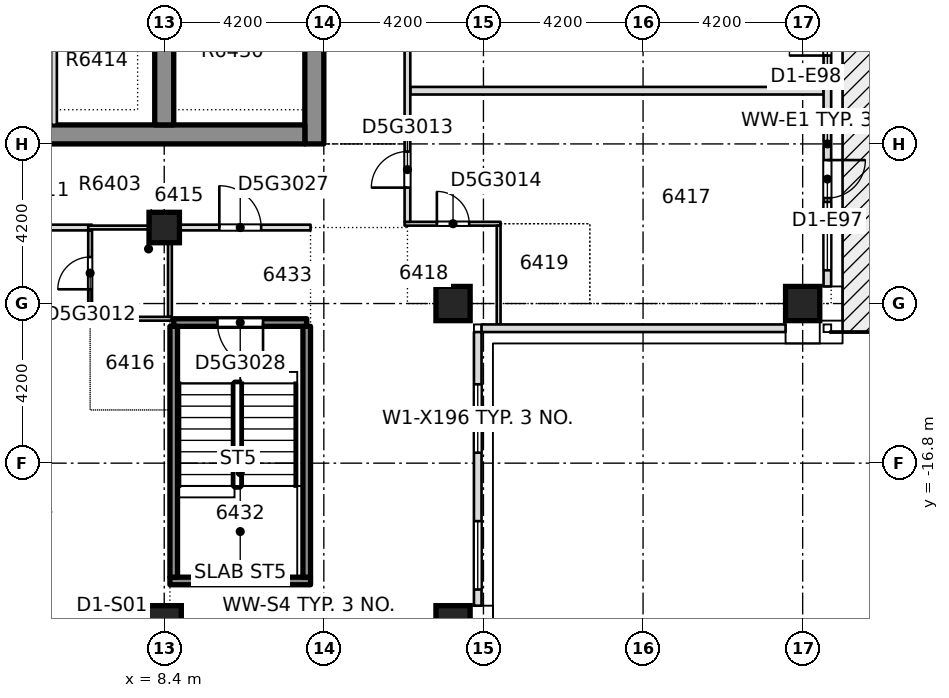
"""IFC4 building model, lengths in metres.
Left out: names, types, materials, properties, quantities, classifications, styles, units other than length and angle.
Written with IfcOpenShell. Run it as: python <this file> out.ifc"""

import sys

from ifc_helpers import new_model, si_unit, direction, frame, frame_2d, origin, origin_2d, place, context, subcontext, project, spatial, rectangle, extrude, element, fill, save


model = new_model("IFC4")
c1 = context("Model", 3, precision=1e-05, world=origin(), true_north=direction((0.0, 1.0)))
c2 = subcontext(c1, "Body", "Model", "MODEL_VIEW")
j1 = project(units=[si_unit("LENGTHUNIT", "METRE"), si_unit("PLANEANGLEUNIT", "RADIAN")], contexts=[c1])
p1 = place(None, origin())
s1 = spatial("IfcSite", under=j1, at=p1, CompositionType="ELEMENT")
p2 = place(p1, origin())
s2 = spatial("IfcBuilding", under=s1, at=p2, CompositionType="ELEMENT")
p3 = place(p2, frame((0.0, 0.0, 244.15)))
s3 = spatial("IfcBuildingStorey", under=s2, at=p3, CompositionType="ELEMENT", Elevation=244.15)
p4 = place(p3, frame((12.35, -8.4, -0.4), z_axis=(0.0, 0.0, 1.0), x_axis=(0.0, 1.0, 0.0)))
e1 = element("IfcWall", 1, at=p4, inside=s3, PredefinedType="SHEAR", context=c2, shape_type="SweptSolid", body=[
    extrude(rectangle(XDim=30.15, YDim=0.5, at=frame_2d((15.075, 0.0))), origin(), (0.0, 0.0, 1.0), 3.45),
])
p5 = place(p4, frame((3.416, 0.0, 0.4)))
e2 = element("IfcOpeningElement", 2, at=p5, cuts=e1, PredefinedType="OPENING", context=c2, shape_type="SweptSolid", body=[
    extrude(rectangle(XDim=0.95, YDim=2.1, at=frame_2d((0.475, 1.05))), frame((0.0, 0.26, 0.0), z_axis=(0.0, -1.0, 0.0), x_axis=(1.0, 0.0, 0.0)), (0.0, 0.0, 1.0), 0.52),
])
p6 = place(p4, frame((7.932, 0.0, 0.4)))
e3 = element("IfcOpeningElement", 3, at=p6, cuts=e1, PredefinedType="OPENING", context=c2, shape_type="SweptSolid", body=[
    extrude(rectangle(XDim=0.95, YDim=2.1, at=frame_2d((0.475, 1.05))), frame((0.0, 0.26, 0.0), z_axis=(0.0, -1.0, 0.0), x_axis=(1.0, 0.0, 0.0)), (0.0, 0.0, 1.0), 0.52),
])
p7 = place(p4, frame((12.144, 0.0, 0.4)))
e4 = element("IfcOpeningElement", 4, at=p7, cuts=e1, PredefinedType="OPENING", context=c2, shape_type="SweptSolid", body=[
    extrude(rectangle(XDim=0.95, YDim=2.1, at=frame_2d((0.475, 1.05))), frame((0.0, 0.26, 0.0), z_axis=(0.0, -1.0, 0.0), x_axis=(1.0, 0.0, 0.0)), (0.0, 0.0, 1.0), 0.52),
])
p8 = place(p4, frame((16.477, 0.0, 0.4)))
e5 = element("IfcOpeningElement", 5, at=p8, cuts=e1, PredefinedType="OPENING", context=c2, shape_type="SweptSolid", body=[
    extrude(rectangle(XDim=0.95, YDim=2.1, at=frame_2d((0.475, 1.05))), frame((0.0, 0.26, 0.0), z_axis=(0.0, -1.0, 0.0), x_axis=(1.0, 0.0, 0.0)), (0.0, 0.0, 1.0), 0.52),
])
p9 = place(p4, frame((23.605, 0.0, 0.4)))
e6 = element("IfcOpeningElement", 6, at=p9, cuts=e1, PredefinedType="OPENING", context=c2, shape_type="SweptSolid", body=[
    extrude(rectangle(XDim=0.95, YDim=2.1, at=frame_2d((0.475, 1.05))), frame((0.0, 0.26, 0.0), z_axis=(0.0, -1.0, 0.0), x_axis=(1.0, 0.0, 0.0)), (0.0, 0.0, 1.0), 0.52),
])
p10 = place(p4, frame((27.63, 0.0, 0.4)))
e7 = element("IfcOpeningElement", 7, at=p10, cuts=e1, PredefinedType="OPENING", context=c2, shape_type="SweptSolid", body=[
    extrude(rectangle(XDim=0.95, YDim=2.1, at=frame_2d((0.475, 1.05))), frame((0.0, 0.26, 0.0), z_axis=(0.0, -1.0, 0.0), x_axis=(1.0, 0.0, 0.0)), (0.0, 0.0, 1.0), 0.52),
])
p11 = place(p4, frame((19.3, 0.0, 0.4)))
e8 = element("IfcOpeningElement", 8, at=p11, cuts=e1, PredefinedType="OPENING", context=c2, shape_type="SweptSolid", body=[
    extrude(rectangle(XDim=1.2, YDim=2.1, at=frame_2d((0.6, 1.05))), frame((0.0, 0.26, 0.0), z_axis=(0.0, -1.0, 0.0), x_axis=(1.0, 0.0, 0.0)), (0.0, 0.0, 1.0), 0.52),
])
p12 = place(p3, frame((-12.1, -8.15, -0.4), z_axis=(0.0, 0.0, 1.0), x_axis=(1.0, 0.0, 0.0)))
e9 = element("IfcWall", 9, at=p12, inside=s3, PredefinedType="SHEAR", context=c2, shape_type="SweptSolid", body=[
    extrude(rectangle(XDim=24.2, YDim=0.5, at=frame_2d((12.1, 0.0))), origin(), (0.0, 0.0, 1.0), 3.45),
])
p13 = place(p12, frame((7.35, 0.0, 0.4)))
e10 = element("IfcOpeningElement", 10, at=p13, cuts=e9, PredefinedType="OPENING", context=c2, shape_type="SweptSolid", body=[
    extrude(rectangle(XDim=1.8, YDim=2.1, at=frame_2d((0.9, 1.05))), frame((0.0, 0.26, 0.0), z_axis=(0.0, -1.0, 0.0), x_axis=(1.0, 0.0, 0.0)), (0.0, 0.0, 1.0), 0.52),
])
p14 = place(p12, frame((15.05, 0.0, 0.4)))
e11 = element("IfcOpeningElement", 11, at=p14, cuts=e9, PredefinedType="OPENING", context=c2, shape_type="SweptSolid", body=[
    extrude(rectangle(XDim=1.8, YDim=2.1, at=frame_2d((0.9, 1.05))), frame((0.0, 0.26, 0.0), z_axis=(0.0, -1.0, 0.0), x_axis=(1.0, 0.0, 0.0)), (0.0, 0.0, 1.0), 0.52),
])
p15 = place(p3, frame((8.4, -7.9, -0.4), z_axis=(0.0, 0.0, 1.0), x_axis=(0.0, 1.0, 0.0)))
e12 = element("IfcWall", 12, at=p15, inside=s3, PredefinedType="SHEAR", context=c2, shape_type="SweptSolid", body=[
    extrude(rectangle(XDim=29.15, YDim=0.5, at=frame_2d((14.575, 0.0))), origin(), (0.0, 0.0, 1.0), 3.45),
])
p16 = place(p15, frame((18.8, 0.0, 0.4)))
e13 = element("IfcOpeningElement", 13, at=p16, cuts=e12, PredefinedType="OPENING", context=c2, shape_type="SweptSolid", body=[
    extrude(rectangle(XDim=1.2, YDim=2.1, at=frame_2d((0.6, 1.05))), frame((0.0, 0.26, 0.0), z_axis=(0.0, -1.0, 0.0), x_axis=(1.0, 0.0, 0.0)), (0.0, 0.0, 1.0), 0.52),
])
for number, where, z_axis, x_axis in (
    (14, (8.4, -21.0, -0.4), (0.0, 0.0, 1.0), (1.0, 0.0, 0.0)),
    (15, (16.0, -21.0, -0.4), (0.0, 0.0, 1.0), (1.0, 0.0, 0.0)),
    (16, (16.0, -12.6, -0.4), (0.0, 0.0, 1.0), (1.0, 0.0, 0.0)),
    (17, (25.2, -12.6, -0.4), (0.0, 0.0, 1.0), (1.0, 0.0, 0.0)),
):
    element("IfcColumn", number, at=place(p3, frame(where, z_axis=z_axis, x_axis=x_axis)), inside=s3, PredefinedType="COLUMN", context=c2, shape_type="SweptSolid", body=[
        extrude(rectangle(XDim=0.9, YDim=0.9, at=origin_2d()), origin(), (0.0, 0.0, 1.0), 3.45),
    ])
p17 = place(p3, frame((8.4, -10.6, -0.4), z_axis=(0.0, 0.0, 1.0), x_axis=(1.0, 0.0, 0.0)))
e18 = element("IfcColumn", 18, at=p17, inside=s3, PredefinedType="COLUMN", context=c2, shape_type="SweptSolid", body=[
    extrude(rectangle(XDim=0.8, YDim=0.8, at=origin_2d()), origin(), (0.0, 0.0, 1.0), 3.45),
])
p18 = place(p3, frame((8.65, -13.1, 0.0), z_axis=(0.0, 0.0, 1.0), x_axis=(1.0, 0.0, 0.0)))
e19 = element("IfcWall", 19, at=p18, inside=s3, PredefinedType="SOLIDWALL", context=c2, shape_type="SweptSolid", body=[
    extrude(rectangle(XDim=3.5, YDim=0.2, at=frame_2d((1.75, 0.0))), origin(), (0.0, 0.0, 1.0), 3.05),
])
p19 = place(p18, frame((1.15, 0.0, 0.0)))
e20 = element("IfcOpeningElement", 20, at=p19, cuts=e19, PredefinedType="OPENING", context=c2, shape_type="SweptSolid", body=[
    extrude(rectangle(XDim=1.2, YDim=2.1, at=frame_2d((0.6, 1.05))), frame((0.0, 0.11, 0.0), z_axis=(0.0, -1.0, 0.0), x_axis=(1.0, 0.0, 0.0)), (0.0, 0.0, 1.0), 0.22),
])
p20 = place(p3, frame((6.4, -13.0, 0.0), z_axis=(0.0, 0.0, 1.0), x_axis=(1.0, 0.0, 0.0)))
e21 = element("IfcWall", 21, at=p20, inside=s3, PredefinedType="PARTITIONING", context=c2, shape_type="SweptSolid", body=[
    extrude(rectangle(XDim=2.2, YDim=0.1, at=frame_2d((1.1, 0.0))), origin(), (0.0, 0.0, 1.0), 3.05),
])
p21 = place(p3, frame((-1.9, -10.6, 0.0), z_axis=(0.0, 0.0, 1.0), x_axis=(1.0, 0.0, 0.0)))
e22 = element("IfcWall", 22, at=p21, inside=s3, PredefinedType="PARTITIONING", context=c2, shape_type="SweptSolid", body=[
    extrude(rectangle(XDim=8.4, YDim=0.15, at=frame_2d((4.2, 0.0))), origin(), (0.0, 0.0, 1.0), 3.05),
])
p22 = place(p21, frame((5.575, 0.0, 0.0)))
e23 = element("IfcOpeningElement", 23, at=p22, cuts=e22, PredefinedType="OPENING", context=c2, shape_type="SweptSolid", body=[
    extrude(rectangle(XDim=0.95, YDim=2.1, at=frame_2d((0.475, 1.05))), frame((0.0, 0.085, 0.0), z_axis=(0.0, -1.0, 0.0), x_axis=(1.0, 0.0, 0.0)), (0.0, 0.0, 1.0), 0.17),
])
p23 = place(p21, frame((2.4, 0.0, 0.0)))
e24 = element("IfcOpeningElement", 24, at=p23, cuts=e22, PredefinedType="OPENING", context=c2, shape_type="SweptSolid", body=[
    extrude(rectangle(XDim=1.1, YDim=2.1, at=frame_2d((0.55, 1.05))), frame((0.0, 0.085, 0.0), z_axis=(0.0, -1.0, 0.0), x_axis=(1.0, 0.0, 0.0)), (0.0, 0.0, 1.0), 0.17),
])
p24 = place(p3, frame((6.4, -10.6, 0.0), z_axis=(0.0, 0.0, 1.0), x_axis=(1.0, 0.0, 0.0)))
e25 = element("IfcWall", 25, at=p24, inside=s3, PredefinedType="PARTITIONING", context=c2, shape_type="SweptSolid", body=[
    extrude(rectangle(XDim=2.2, YDim=0.1, at=frame_2d((1.1, 0.0))), origin(), (0.0, 0.0, 1.0), 3.05),
])
p25 = place(p3, frame((8.5, -10.6, 0.0), z_axis=(0.0, 0.0, 1.0), x_axis=(1.0, 0.0, 0.0)))
e26 = element("IfcWall", 26, at=p25, inside=s3, PredefinedType="PARTITIONING", context=c2, shape_type="SweptSolid", body=[
    extrude(rectangle(XDim=3.75, YDim=0.15, at=frame_2d((1.875, 0.0))), origin(), (0.0, 0.0, 1.0), 3.05),
])
p26 = place(p25, frame((1.35, 0.0, 0.0)))
e27 = element("IfcOpeningElement", 27, at=p26, cuts=e26, PredefinedType="OPENING", context=c2, shape_type="SweptSolid", body=[
    extrude(rectangle(XDim=1.1, YDim=2.1, at=frame_2d((0.55, 1.05))), frame((0.0, 0.085, 0.0), z_axis=(0.0, -1.0, 0.0), x_axis=(1.0, 0.0, 0.0)), (0.0, 0.0, 1.0), 0.17),
])
p27 = place(p3, frame((14.725, -10.5, 0.0), z_axis=(0.0, 0.0, 1.0), x_axis=(1.0, 0.0, 0.0)))
e28 = element("IfcWall", 28, at=p27, inside=s3, PredefinedType="PARTITIONING", context=c2, shape_type="SweptSolid", body=[
    extrude(rectangle(XDim=2.525, YDim=0.1, at=frame_2d((1.262, 0.0))), origin(), (0.0, 0.0, 1.0), 3.05),
])
p28 = place(p27, frame((0.85, 0.0, 0.0)))
e29 = element("IfcOpeningElement", 29, at=p28, cuts=e28, PredefinedType="OPENING", context=c2, shape_type="SweptSolid", body=[
    extrude(rectangle(XDim=0.85, YDim=2.1, at=frame_2d((0.425, 1.05))), frame((0.0, 0.06, 0.0), z_axis=(0.0, -1.0, 0.0), x_axis=(1.0, 0.0, 0.0)), (0.0, 0.0, 1.0), 0.12),
])
p29 = place(p3, frame((14.875, -7.0, 0.0), z_axis=(0.0, 0.0, 1.0), x_axis=(1.0, 0.0, 0.0)))
e30 = element("IfcWall", 30, at=p29, inside=s3, PredefinedType="PARTITIONING", context=c2, shape_type="SweptSolid", body=[
    extrude(rectangle(XDim=10.875, YDim=0.2, at=frame_2d((5.438, 0.0))), origin(), (0.0, 0.0, 1.0), 3.05),
])
p30 = place(p3, frame((6.45, -12.95, 0.0), z_axis=(0.0, 0.0, 1.0), x_axis=(0.0, 1.0, 0.0)))
e31 = element("IfcWall", 31, at=p30, inside=s3, PredefinedType="PARTITIONING", context=c2, shape_type="SweptSolid", body=[
    extrude(rectangle(XDim=2.275, YDim=0.1, at=frame_2d((1.137, 0.0))), origin(), (0.0, 0.0, 1.0), 3.05),
])
p31 = place(p30, frame((0.725, 0.0, 0.0)))
e32 = element("IfcOpeningElement", 32, at=p31, cuts=e31, PredefinedType="OPENING", context=c2, shape_type="SweptSolid", body=[
    extrude(rectangle(XDim=0.85, YDim=2.1, at=frame_2d((0.425, 1.05))), frame((0.0, 0.06, 0.0), z_axis=(0.0, -1.0, 0.0), x_axis=(1.0, 0.0, 0.0)), (0.0, 0.0, 1.0), 0.12),
])
p32 = place(p3, frame((8.55, -12.95, 0.0), z_axis=(0.0, 0.0, 1.0), x_axis=(0.0, 1.0, 0.0)))
e33 = element("IfcWall", 33, at=p32, inside=s3, PredefinedType="PARTITIONING", context=c2, shape_type="SweptSolid", body=[
    extrude(rectangle(XDim=2.275, YDim=0.1, at=frame_2d((1.137, 0.0))), origin(), (0.0, 0.0, 1.0), 3.05),
])
p33 = place(p3, frame((14.8, -10.45, 0.0), z_axis=(0.0, 0.0, 1.0), x_axis=(0.0, 1.0, 0.0)))
e34 = element("IfcWall", 34, at=p33, inside=s3, PredefinedType="PARTITIONING", context=c2, shape_type="SweptSolid", body=[
    extrude(rectangle(XDim=19.03, YDim=0.15, at=frame_2d((9.515, 0.0))), origin(), (0.0, 0.0, 1.0), 3.05),
])
p34 = place(p33, frame((0.9, 0.0, 0.0)))
e35 = element("IfcOpeningElement", 35, at=p34, cuts=e34, PredefinedType="OPENING", context=c2, shape_type="SweptSolid", body=[
    extrude(rectangle(XDim=0.95, YDim=2.1, at=frame_2d((0.475, 1.05))), frame((0.0, 0.085, 0.0), z_axis=(0.0, -1.0, 0.0), x_axis=(1.0, 0.0, 0.0)), (0.0, 0.0, 1.0), 0.17),
])
p35 = place(p33, frame((15.965, 0.0, 0.0)))
e36 = element("IfcOpeningElement", 36, at=p35, cuts=e34, PredefinedType="OPENING", context=c2, shape_type="SweptSolid", body=[
    extrude(rectangle(XDim=1.0, YDim=2.1, at=frame_2d((0.5, 1.05))), frame((0.0, 0.085, 0.0), z_axis=(0.0, -1.0, 0.0), x_axis=(1.0, 0.0, 0.0)), (0.0, 0.0, 1.0), 0.17),
])
p36 = place(p33, frame((9.9, 0.0, 0.0)))
e37 = element("IfcOpeningElement", 37, at=p36, cuts=e34, PredefinedType="OPENING", context=c2, shape_type="SweptSolid", body=[
    extrude(rectangle(XDim=1.1, YDim=2.1, at=frame_2d((0.55, 1.05))), frame((0.0, 0.085, 0.0), z_axis=(0.0, -1.0, 0.0), x_axis=(1.0, 0.0, 0.0)), (0.0, 0.0, 1.0), 0.17),
])
p37 = place(p33, frame((4.75, 0.0, 0.0)))
e38 = element("IfcOpeningElement", 38, at=p37, cuts=e34, PredefinedType="OPENING", context=c2, shape_type="SweptSolid", body=[
    extrude(rectangle(XDim=1.0, YDim=2.1, at=frame_2d((0.5, 1.05))), frame((0.0, 0.085, 0.0), z_axis=(0.0, -1.0, 0.0), x_axis=(1.0, 0.0, 0.0)), (0.0, 0.0, 1.0), 0.17),
])
p38 = place(p3, frame((17.2, -13.15, 0.0), z_axis=(0.0, 0.0, 1.0), x_axis=(0.0, 1.0, 0.0)))
e39 = element("IfcWall", 39, at=p38, inside=s3, PredefinedType="PARTITIONING", context=c2, shape_type="SweptSolid", body=[
    extrude(rectangle(XDim=2.6, YDim=0.1, at=frame_2d((1.3, 0.0))), origin(), (0.0, 0.0, 1.0), 3.05),
])
p39 = place(p3, frame((16.65, -20.55, 0.0), z_axis=(0.0, 0.0, 1.0), x_axis=(0.0, 1.0, 0.0)))
e40 = element("IfcWall", 40, at=p39, inside=s3, PredefinedType="STANDARD", context=c2, shape_type="SweptSolid", body=[
    extrude(rectangle(XDim=7.2, YDim=0.2, at=frame_2d((3.6, 0.0))), origin(), (0.0, 0.0, 1.0), 3.05),
])
p40 = place(p39, frame((0.425, 0.0, 0.2)))
e41 = element("IfcOpeningElement", 41, at=p40, cuts=e40, PredefinedType="OPENING", context=c2, shape_type="SweptSolid", body=[
    extrude(rectangle(XDim=1.8, YDim=2.65, at=frame_2d((0.9, 1.325))), frame((0.0, 0.11, 0.0), z_axis=(0.0, -1.0, 0.0), x_axis=(1.0, 0.0, 0.0)), (0.0, 0.0, 1.0), 0.22),
])
p41 = place(p39, frame((4.025, 0.0, 0.2)))
e42 = element("IfcOpeningElement", 42, at=p41, cuts=e40, PredefinedType="OPENING", context=c2, shape_type="SweptSolid", body=[
    extrude(rectangle(XDim=1.8, YDim=2.65, at=frame_2d((0.9, 1.325))), frame((0.0, 0.11, 0.0), z_axis=(0.0, -1.0, 0.0), x_axis=(1.0, 0.0, 0.0)), (0.0, 0.0, 1.0), 0.22),
])
p42 = place(p3, frame((16.75, -13.25, 0.0), z_axis=(0.0, 0.0, 1.0), x_axis=(1.0, 0.0, 0.0)))
e43 = element("IfcWall", 43, at=p42, inside=s3, PredefinedType="STANDARD", context=c2, shape_type="SweptSolid", body=[
    extrude(rectangle(XDim=8.0, YDim=0.2, at=frame_2d((4.0, 0.0))), origin(), (0.0, 0.0, 1.0), 3.05),
])
p43 = place(p3, frame((25.85, -12.15, 0.0), z_axis=(0.0, 0.0, 1.0), x_axis=(0.0, 1.0, 0.0)))
e44 = element("IfcWall", 44, at=p43, inside=s3, PredefinedType="STANDARD", context=c2, shape_type="SweptSolid", body=[
    extrude(rectangle(XDim=7.5, YDim=0.2, at=frame_2d((3.75, 0.0))), origin(), (0.0, 0.0, 1.0), 3.05),
])
p44 = place(p43, frame((0.425, 0.0, 0.2)))
e45 = element("IfcOpeningElement", 45, at=p44, cuts=e44, PredefinedType="OPENING", context=c2, shape_type="SweptSolid", body=[
    extrude(rectangle(XDim=1.8, YDim=2.65, at=frame_2d((0.9, 1.325))), frame((0.0, 0.11, 0.0), z_axis=(0.0, -1.0, 0.0), x_axis=(1.0, 0.0, 0.0)), (0.0, 0.0, 1.0), 0.22),
])
p45 = place(p43, frame((2.325, 0.0, 0.0)))
e46 = element("IfcOpeningElement", 46, at=p45, cuts=e44, PredefinedType="OPENING", context=c2, shape_type="SweptSolid", body=[
    extrude(rectangle(XDim=1.0, YDim=2.4, at=frame_2d((0.5, 1.2))), frame((0.0, 0.11, 0.0), z_axis=(0.0, -1.0, 0.0), x_axis=(1.0, 0.0, 0.0)), (0.0, 0.0, 1.0), 0.22),
])
p46 = place(p43, frame((6.075, 0.0, 0.0)))
e47 = element("IfcOpeningElement", 47, at=p46, cuts=e44, PredefinedType="OPENING", context=c2, shape_type="SweptSolid", body=[
    extrude(rectangle(XDim=1.0, YDim=2.4, at=frame_2d((0.5, 1.2))), frame((0.0, 0.11, 0.0), z_axis=(0.0, -1.0, 0.0), x_axis=(1.0, 0.0, 0.0)), (0.0, 0.0, 1.0), 0.22),
])
p47 = place(p3, frame((5.5, -7.899, 0.0), z_axis=(0.0, 0.0, 1.0), x_axis=(0.0, 1.0, 0.0)))
e48 = element("IfcWall", 48, at=p47, inside=s3, PredefinedType="PARTITIONING", context=c2, shape_type="SweptSolid", body=[
    extrude(rectangle(XDim=12.324, YDim=0.15, at=frame_2d((6.162, 0.0))), origin(), (0.0, 0.0, 1.0), 3.05),
])
p48 = place(p47, frame((5.924, 0.0, 0.0)))
e49 = element("IfcOpeningElement", 49, at=p48, cuts=e48, PredefinedType="OPENING", context=c2, shape_type="SweptSolid", body=[
    extrude(rectangle(XDim=0.95, YDim=2.1, at=frame_2d((0.475, 1.05))), frame((0.0, 0.085, 0.0), z_axis=(0.0, -1.0, 0.0), x_axis=(1.0, 0.0, 0.0)), (0.0, 0.0, 1.0), 0.17),
])
p49 = place(p3, frame((8.55, -19.9, 0.0), z_axis=(0.0, 0.0, 1.0), x_axis=(1.0, 0.0, 0.0)))
e50 = element("IfcWall", 50, at=p49, inside=s3, PredefinedType="SOLIDWALL", context=c2, shape_type="SweptSolid", body=[
    extrude(rectangle(XDim=3.7, YDim=0.2, at=frame_2d((1.85, 0.0))), origin(), (0.0, 0.0, 1.0), 3.05),
])
for number, where, z_axis, x_axis in (
    (51, (8.65, -19.8, 0.0), (0.0, 0.0, 1.0), (0.0, 1.0, 0.0)),
    (52, (12.15, -19.8, 0.0), (0.0, 0.0, 1.0), (0.0, 1.0, 0.0)),
):
    element("IfcWall", number, at=place(p3, frame(where, z_axis=z_axis, x_axis=x_axis)), inside=s3, PredefinedType="SOLIDWALL", context=c2, shape_type="SweptSolid", body=[
        extrude(rectangle(XDim=6.6, YDim=0.2, at=frame_2d((3.3, 0.0))), origin(), (0.0, 0.0, 1.0), 3.05),
    ])
p50 = place(p31, origin())
e53 = element("IfcDoor", 53, at=p50, inside=s3, OperationType="SINGLE_SWING_RIGHT", PredefinedType="DOOR", context=c2, shape_type="SweptSolid", body=[
    extrude(rectangle(XDim=0.85, YDim=2.1, at=frame_2d((0.425, 1.05))), frame((0.0, 0.025, 0.0), z_axis=(0.0, -1.0, 0.0), x_axis=(1.0, 0.0, 0.0)), (0.0, 0.0, 1.0), 0.05),
])
fill(e32, e53)
p51 = place(p34, origin())
e54 = element("IfcDoor", 54, at=p51, inside=s3, OperationType="SINGLE_SWING_RIGHT", PredefinedType="DOOR", context=c2, shape_type="SweptSolid", body=[
    extrude(rectangle(XDim=0.95, YDim=2.1, at=frame_2d((0.475, 1.05))), frame((0.0, 0.025, 0.0), z_axis=(0.0, -1.0, 0.0), x_axis=(1.0, 0.0, 0.0)), (0.0, 0.0, 1.0), 0.05),
])
fill(e35, e54)
p52 = place(p28, origin())
e55 = element("IfcDoor", 55, at=p52, inside=s3, OperationType="SINGLE_SWING_RIGHT", PredefinedType="DOOR", context=c2, shape_type="SweptSolid", body=[
    extrude(rectangle(XDim=0.85, YDim=2.1, at=frame_2d((0.425, 1.05))), frame((0.0, 0.025, 0.0), z_axis=(0.0, -1.0, 0.0), x_axis=(1.0, 0.0, 0.0)), (0.0, 0.0, 1.0), 0.05),
])
fill(e29, e55)
p53 = place(p26, origin())
e56 = element("IfcDoor", 56, at=p53, inside=s3, OperationType="SINGLE_SWING_RIGHT", PredefinedType="DOOR", context=c2, shape_type="SweptSolid", body=[
    extrude(rectangle(XDim=1.1, YDim=2.1, at=frame_2d((0.55, 1.05))), frame((0.0, 0.025, 0.0), z_axis=(0.0, -1.0, 0.0), x_axis=(1.0, 0.0, 0.0)), (0.0, 0.0, 1.0), 0.05),
])
fill(e27, e56)
p54 = place(p19, origin())
e57 = element("IfcDoor", 57, at=p54, inside=s3, OperationType="SINGLE_SWING_RIGHT", PredefinedType="DOOR", context=c2, shape_type="SweptSolid", body=[
    extrude(rectangle(XDim=1.2, YDim=2.1, at=frame_2d((0.6, 1.05))), frame((0.0, 0.025, 0.0), z_axis=(0.0, -1.0, 0.0), x_axis=(1.0, 0.0, 0.0)), (0.0, 0.0, 1.0), 0.05),
])
fill(e20, e57)
p55 = place(p40, origin())
e58 = element("IfcWindow", 58, at=p55, inside=s3, PartitioningType="SINGLE_PANEL", PredefinedType="WINDOW", context=c2, shape_type="SweptSolid", body=[
    extrude(rectangle(XDim=1.8, YDim=2.65, at=frame_2d((0.9, 1.325))), frame((0.0, 0.03, 0.0), z_axis=(0.0, -1.0, 0.0), x_axis=(1.0, 0.0, 0.0)), (0.0, 0.0, 1.0), 0.06),
])
fill(e41, e58)
p56 = place(p41, origin())
e59 = element("IfcWindow", 59, at=p56, inside=s3, PartitioningType="SINGLE_PANEL", PredefinedType="WINDOW", context=c2, shape_type="SweptSolid", body=[
    extrude(rectangle(XDim=1.8, YDim=2.65, at=frame_2d((0.9, 1.325))), frame((0.0, 0.03, 0.0), z_axis=(0.0, -1.0, 0.0), x_axis=(1.0, 0.0, 0.0)), (0.0, 0.0, 1.0), 0.06),
])
fill(e42, e59)
p57 = place(p44, origin())
e60 = element("IfcWindow", 60, at=p57, inside=s3, PartitioningType="SINGLE_PANEL", PredefinedType="WINDOW", context=c2, shape_type="SweptSolid", body=[
    extrude(rectangle(XDim=1.8, YDim=2.65, at=frame_2d((0.9, 1.325))), frame((0.0, 0.03, 0.0), z_axis=(0.0, -1.0, 0.0), x_axis=(1.0, 0.0, 0.0)), (0.0, 0.0, 1.0), 0.06),
])
fill(e45, e60)
p58 = place(p45, origin())
e61 = element("IfcDoor", 61, at=p58, inside=s3, OperationType="SINGLE_SWING_LEFT", PredefinedType="DOOR", context=c2, shape_type="SweptSolid", body=[
    extrude(rectangle(XDim=1.0, YDim=2.4, at=frame_2d((0.5, 1.2))), frame((0.0, 0.025, 0.0), z_axis=(0.0, -1.0, 0.0), x_axis=(1.0, 0.0, 0.0)), (0.0, 0.0, 1.0), 0.05),
])
fill(e46, e61)
p59 = place(p46, origin())
e62 = element("IfcDoor", 62, at=p59, inside=s3, OperationType="SINGLE_SWING_LEFT", PredefinedType="DOOR", context=c2, shape_type="SweptSolid", body=[
    extrude(rectangle(XDim=1.0, YDim=2.4, at=frame_2d((0.5, 1.2))), frame((0.0, 0.025, 0.0), z_axis=(0.0, -1.0, 0.0), x_axis=(1.0, 0.0, 0.0)), (0.0, 0.0, 1.0), 0.05),
])
fill(e47, e62)
save(model, sys.argv[1])
